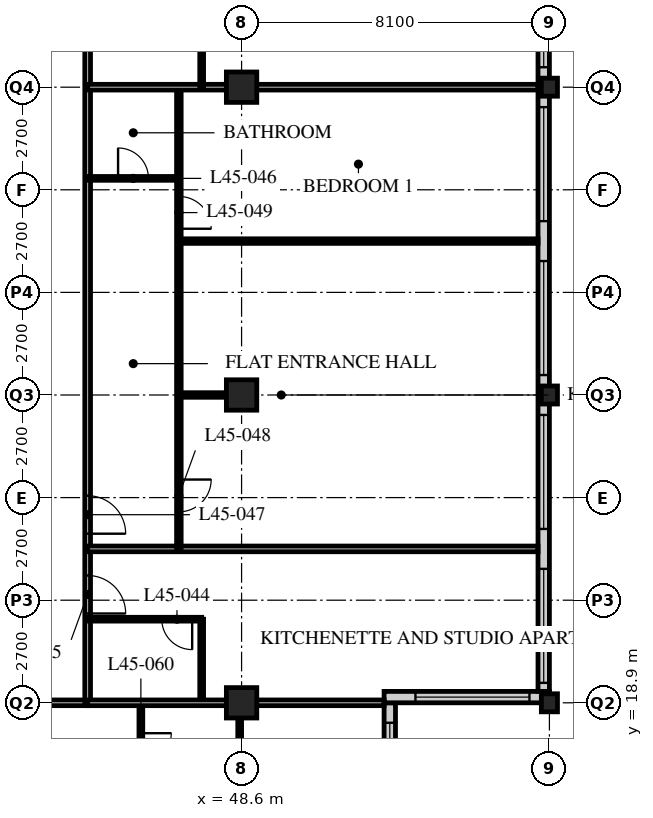
"""IFC4 building model, lengths in metres.
Left out: names, types, materials, properties, quantities, classifications, styles, units other than length and angle.
Written with IfcOpenShell. Run it as: python <this file> out.ifc"""

import sys

from ifc_helpers import new_model, si_unit, direction, frame, frame_2d, origin, origin_2d, place, context, subcontext, project, spatial, rectangle, hollow_rectangle, i_section, extrude, element, fill, save


model = new_model("IFC4")
c1 = context("Model", 3, precision=1e-05, world=origin(), true_north=direction((0.0, 1.0)))
c2 = subcontext(c1, "Body", "Model", "MODEL_VIEW")
j1 = project(units=[si_unit("LENGTHUNIT", "METRE"), si_unit("PLANEANGLEUNIT", "RADIAN")], contexts=[c1])
p1 = place(None, origin())
s1 = spatial("IfcSite", under=j1, at=p1, CompositionType="ELEMENT")
p2 = place(p1, origin())
s2 = spatial("IfcBuilding", under=s1, at=p2, CompositionType="ELEMENT")
p3 = place(p2, frame((0.0, 0.0, 177.6)))
s3 = spatial("IfcBuildingStorey", under=s2, at=p3, CompositionType="ELEMENT", Elevation=177.6)
for number, where, z_axis, x_axis in (
    (1, (48.6, 18.9, 0.0), (0.0, 0.0, 1.0), (1.0, 0.0, 0.0)),
    (2, (48.6, 27.0, 0.0), (0.0, 0.0, 1.0), (1.0, 0.0, 0.0)),
    (3, (48.6, 35.1, 0.0), (0.0, 0.0, 1.0), (1.0, 0.0, 0.0)),
):
    element("IfcColumn", number, at=place(p3, frame(where, z_axis=z_axis, x_axis=x_axis)), inside=s3, PredefinedType="COLUMN", context=c2, shape_type="SweptSolid", body=[
        extrude(hollow_rectangle(XDim=0.8, YDim=0.8, WallThickness=0.08, at=origin_2d()), origin(), (0.0, 0.0, 1.0), 3.6),
    ])
for number, where, z_axis, x_axis in (
    (4, (56.7, 18.9, 0.0), (0.0, 0.0, 1.0), (1.0, 0.0, 0.0)),
    (5, (56.7, 27.0, 0.0), (0.0, 0.0, 1.0), (1.0, 0.0, 0.0)),
    (6, (56.7, 35.1, 0.0), (0.0, 0.0, 1.0), (1.0, 0.0, 0.0)),
):
    element("IfcColumn", number, at=place(p3, frame(where, z_axis=z_axis, x_axis=x_axis)), inside=s3, PredefinedType="COLUMN", context=c2, shape_type="SweptSolid", body=[
        extrude(i_section(OverallWidth=0.424, OverallDepth=0.475, WebThickness=0.048, FlangeThickness=0.077, FilletRadius=0.015, at=origin_2d()), origin(), (0.0, 0.0, 1.0), 3.6),
    ])
p4 = place(p3, frame((52.5, 15.15, 0.0), z_axis=(0.0, 0.0, 1.0), x_axis=(0.0, 1.0, 0.0)))
e7 = element("IfcWall", 7, at=p4, inside=s3, PredefinedType="SOLIDWALL", context=c2, shape_type="SweptSolid", body=[
    extrude(rectangle(XDim=3.75, YDim=0.3, at=frame_2d((1.875, 0.0))), origin(), (0.0, 0.0, 1.0), 3.39),
])
p5 = place(p4, frame((0.225, 0.0, 0.6)))
e8 = element("IfcOpeningElement", 8, at=p5, cuts=e7, PredefinedType="OPENING", context=c2, shape_type="SweptSolid", body=[
    extrude(rectangle(XDim=3.0, YDim=2.0, at=frame_2d((1.5, 1.0))), frame((0.0, 0.16, 0.0), z_axis=(0.0, -1.0, 0.0), x_axis=(1.0, 0.0, 0.0)), (0.0, 0.0, 1.0), 0.32),
])
p6 = place(p3, frame((52.35, 19.05, 0.0), z_axis=(0.0, 0.0, 1.0), x_axis=(1.0, 0.0, 0.0)))
e9 = element("IfcWall", 9, at=p6, inside=s3, PredefinedType="SOLIDWALL", context=c2, shape_type="SweptSolid", body=[
    extrude(rectangle(XDim=4.35, YDim=0.3, at=frame_2d((2.175, 0.0))), origin(), (0.0, 0.0, 1.0), 3.39),
])
p7 = place(p6, frame((0.825, 0.0, 0.6)))
e10 = element("IfcOpeningElement", 10, at=p7, cuts=e9, PredefinedType="OPENING", context=c2, shape_type="SweptSolid", body=[
    extrude(rectangle(XDim=3.0, YDim=2.0, at=frame_2d((1.5, 1.0))), frame((0.0, 0.16, 0.0), z_axis=(0.0, -1.0, 0.0), x_axis=(1.0, 0.0, 0.0)), (0.0, 0.0, 1.0), 0.32),
])
p8 = place(p3, frame((56.55, 19.2, 0.0), z_axis=(0.0, 0.0, 1.0), x_axis=(0.0, 1.0, 0.0)))
e11 = element("IfcWall", 11, at=p8, inside=s3, PredefinedType="SOLIDWALL", context=c2, shape_type="SweptSolid", body=[
    extrude(rectangle(XDim=32.1, YDim=0.3, at=frame_2d((16.05, 0.0))), origin(), (0.0, 0.0, 1.0), 3.39),
])
p9 = place(p8, frame((0.225, 0.0, 0.6)))
e12 = element("IfcOpeningElement", 12, at=p9, cuts=e11, PredefinedType="OPENING", context=c2, shape_type="SweptSolid", body=[
    extrude(rectangle(XDim=3.0, YDim=2.4, at=frame_2d((1.5, 1.2))), frame((0.0, 0.16, 0.0), z_axis=(0.0, -1.0, 0.0), x_axis=(1.0, 0.0, 0.0)), (0.0, 0.0, 1.0), 0.32),
])
p10 = place(p8, frame((4.275, 0.0, 0.6)))
e13 = element("IfcOpeningElement", 13, at=p10, cuts=e11, PredefinedType="OPENING", context=c2, shape_type="SweptSolid", body=[
    extrude(rectangle(XDim=3.0, YDim=2.4, at=frame_2d((1.5, 1.2))), frame((0.0, 0.16, 0.0), z_axis=(0.0, -1.0, 0.0), x_axis=(1.0, 0.0, 0.0)), (0.0, 0.0, 1.0), 0.32),
])
p11 = place(p8, frame((8.325, 0.0, 0.6)))
e14 = element("IfcOpeningElement", 14, at=p11, cuts=e11, PredefinedType="OPENING", context=c2, shape_type="SweptSolid", body=[
    extrude(rectangle(XDim=3.0, YDim=2.4, at=frame_2d((1.5, 1.2))), frame((0.0, 0.16, 0.0), z_axis=(0.0, -1.0, 0.0), x_axis=(1.0, 0.0, 0.0)), (0.0, 0.0, 1.0), 0.32),
])
p12 = place(p8, frame((12.375, 0.0, 0.6)))
e15 = element("IfcOpeningElement", 15, at=p12, cuts=e11, PredefinedType="OPENING", context=c2, shape_type="SweptSolid", body=[
    extrude(rectangle(XDim=3.0, YDim=2.4, at=frame_2d((1.5, 1.2))), frame((0.0, 0.16, 0.0), z_axis=(0.0, -1.0, 0.0), x_axis=(1.0, 0.0, 0.0)), (0.0, 0.0, 1.0), 0.32),
])
p13 = place(p8, frame((16.425, 0.0, 0.6)))
e16 = element("IfcOpeningElement", 16, at=p13, cuts=e11, PredefinedType="OPENING", context=c2, shape_type="SweptSolid", body=[
    extrude(rectangle(XDim=3.0, YDim=2.4, at=frame_2d((1.5, 1.2))), frame((0.0, 0.16, 0.0), z_axis=(0.0, -1.0, 0.0), x_axis=(1.0, 0.0, 0.0)), (0.0, 0.0, 1.0), 0.32),
])
p14 = place(p8, frame((20.475, 0.0, 0.6)))
e17 = element("IfcOpeningElement", 17, at=p14, cuts=e11, PredefinedType="OPENING", context=c2, shape_type="SweptSolid", body=[
    extrude(rectangle(XDim=3.0, YDim=2.4, at=frame_2d((1.5, 1.2))), frame((0.0, 0.16, 0.0), z_axis=(0.0, -1.0, 0.0), x_axis=(1.0, 0.0, 0.0)), (0.0, 0.0, 1.0), 0.32),
])
p15 = place(p8, frame((24.525, 0.0, 0.6)))
e18 = element("IfcOpeningElement", 18, at=p15, cuts=e11, PredefinedType="OPENING", context=c2, shape_type="SweptSolid", body=[
    extrude(rectangle(XDim=3.0, YDim=2.4, at=frame_2d((1.5, 1.2))), frame((0.0, 0.16, 0.0), z_axis=(0.0, -1.0, 0.0), x_axis=(1.0, 0.0, 0.0)), (0.0, 0.0, 1.0), 0.32),
])
p16 = place(p8, frame((28.575, 0.0, 0.6)))
e19 = element("IfcOpeningElement", 19, at=p16, cuts=e11, PredefinedType="OPENING", context=c2, shape_type="SweptSolid", body=[
    extrude(rectangle(XDim=3.0, YDim=2.4, at=frame_2d((1.5, 1.2))), frame((0.0, 0.16, 0.0), z_axis=(0.0, -1.0, 0.0), x_axis=(1.0, 0.0, 0.0)), (0.0, 0.0, 1.0), 0.32),
])
p17 = place(p3, frame((12.15, 18.9, 0.0), z_axis=(0.0, 0.0, 1.0), x_axis=(1.0, 0.0, 0.0)))
e20 = element("IfcWall", 20, at=p17, inside=s3, PredefinedType="PARTITIONING", context=c2, shape_type="SweptSolid", body=[
    extrude(rectangle(XDim=32.4, YDim=0.15, at=frame_2d((16.2, 0.0))), origin(), (0.0, 0.0, 1.0), 2.778),
])
p18 = place(p17, frame((6.4, 0.0, 0.0)))
e21 = element("IfcOpeningElement", 21, at=p18, cuts=e20, PredefinedType="OPENING", context=c2, shape_type="SweptSolid", body=[
    extrude(rectangle(XDim=1.0, YDim=2.1, at=frame_2d((0.5, 1.05))), frame((0.0, 0.085, 0.0), z_axis=(0.0, -1.0, 0.0), x_axis=(1.0, 0.0, 0.0)), (0.0, 0.0, 1.0), 0.17),
])
p19 = place(p17, frame((8.8, 0.0, 0.0)))
e22 = element("IfcOpeningElement", 22, at=p19, cuts=e20, PredefinedType="OPENING", context=c2, shape_type="SweptSolid", body=[
    extrude(rectangle(XDim=1.0, YDim=2.1, at=frame_2d((0.5, 1.05))), frame((0.0, 0.085, 0.0), z_axis=(0.0, -1.0, 0.0), x_axis=(1.0, 0.0, 0.0)), (0.0, 0.0, 1.0), 0.17),
])
p20 = place(p17, frame((13.05, 0.0, 0.0)))
e23 = element("IfcOpeningElement", 23, at=p20, cuts=e20, PredefinedType="OPENING", context=c2, shape_type="SweptSolid", body=[
    extrude(rectangle(XDim=1.0, YDim=2.1, at=frame_2d((0.5, 1.05))), frame((0.0, 0.085, 0.0), z_axis=(0.0, -1.0, 0.0), x_axis=(1.0, 0.0, 0.0)), (0.0, 0.0, 1.0), 0.17),
])
p21 = place(p17, frame((22.6, 0.0, 0.0)))
e24 = element("IfcOpeningElement", 24, at=p21, cuts=e20, PredefinedType="OPENING", context=c2, shape_type="SweptSolid", body=[
    extrude(rectangle(XDim=1.0, YDim=2.1, at=frame_2d((0.5, 1.05))), frame((0.0, 0.085, 0.0), z_axis=(0.0, -1.0, 0.0), x_axis=(1.0, 0.0, 0.0)), (0.0, 0.0, 1.0), 0.17),
])
p22 = place(p17, frame((25.0, 0.0, 0.0)))
e25 = element("IfcOpeningElement", 25, at=p22, cuts=e20, PredefinedType="OPENING", context=c2, shape_type="SweptSolid", body=[
    extrude(rectangle(XDim=1.0, YDim=2.1, at=frame_2d((0.5, 1.05))), frame((0.0, 0.085, 0.0), z_axis=(0.0, -1.0, 0.0), x_axis=(1.0, 0.0, 0.0)), (0.0, 0.0, 1.0), 0.17),
])
p23 = place(p17, frame((1.525, 0.0, 0.0)))
e26 = element("IfcOpeningElement", 26, at=p23, cuts=e20, PredefinedType="OPENING", context=c2, shape_type="SweptSolid", body=[
    extrude(rectangle(XDim=1.0, YDim=2.1, at=frame_2d((0.5, 1.05))), frame((0.0, 0.085, 0.0), z_axis=(0.0, -1.0, 0.0), x_axis=(1.0, 0.0, 0.0)), (0.0, 0.0, 1.0), 0.17),
])
p24 = place(p17, frame((29.875, 0.0, 0.0)))
e27 = element("IfcOpeningElement", 27, at=p24, cuts=e20, PredefinedType="OPENING", context=c2, shape_type="SweptSolid", body=[
    extrude(rectangle(XDim=1.0, YDim=2.1, at=frame_2d((0.5, 1.05))), frame((0.0, 0.085, 0.0), z_axis=(0.0, -1.0, 0.0), x_axis=(1.0, 0.0, 0.0)), (0.0, 0.0, 1.0), 0.17),
])
p25 = place(p3, frame((44.55, 18.9, 0.0), z_axis=(0.0, 0.0, 1.0), x_axis=(0.0, 1.0, 0.0)))
e28 = element("IfcWall", 28, at=p25, inside=s3, PredefinedType="PARTITIONING", context=c2, shape_type="SweptSolid", body=[
    extrude(rectangle(XDim=24.3, YDim=0.15, at=frame_2d((12.15, 0.0))), origin(), (0.0, 0.0, 1.0), 3.39),
])
p26 = place(p25, frame((2.35, 0.0, 0.0)))
e29 = element("IfcOpeningElement", 29, at=p26, cuts=e28, PredefinedType="OPENING", context=c2, shape_type="SweptSolid", body=[
    extrude(rectangle(XDim=1.0, YDim=2.1, at=frame_2d((0.5, 1.05))), frame((0.0, 0.085, 0.0), z_axis=(0.0, -1.0, 0.0), x_axis=(1.0, 0.0, 0.0)), (0.0, 0.0, 1.0), 0.17),
])
p27 = place(p25, frame((4.45, 0.0, 0.0)))
e30 = element("IfcOpeningElement", 30, at=p27, cuts=e28, PredefinedType="OPENING", context=c2, shape_type="SweptSolid", body=[
    extrude(rectangle(XDim=1.0, YDim=2.1, at=frame_2d((0.5, 1.05))), frame((0.0, 0.085, 0.0), z_axis=(0.0, -1.0, 0.0), x_axis=(1.0, 0.0, 0.0)), (0.0, 0.0, 1.0), 0.17),
])
p28 = place(p25, frame((18.55, 0.0, 0.0)))
e31 = element("IfcOpeningElement", 31, at=p28, cuts=e28, PredefinedType="OPENING", context=c2, shape_type="SweptSolid", body=[
    extrude(rectangle(XDim=1.0, YDim=2.1, at=frame_2d((0.5, 1.05))), frame((0.0, 0.085, 0.0), z_axis=(0.0, -1.0, 0.0), x_axis=(1.0, 0.0, 0.0)), (0.0, 0.0, 1.0), 0.17),
])
p29 = place(p25, frame((22.6, 0.0, 0.0)))
e32 = element("IfcOpeningElement", 32, at=p29, cuts=e28, PredefinedType="OPENING", context=c2, shape_type="SweptSolid", body=[
    extrude(rectangle(XDim=1.0, YDim=2.1, at=frame_2d((0.5, 1.05))), frame((0.0, 0.085, 0.0), z_axis=(0.0, -1.0, 0.0), x_axis=(1.0, 0.0, 0.0)), (0.0, 0.0, 1.0), 0.17),
])
p30 = place(p3, frame((47.55, 18.9, 0.0), z_axis=(0.0, 0.0, 1.0), x_axis=(0.0, 1.0, 0.0)))
e33 = element("IfcWall", 33, at=p30, inside=s3, PredefinedType="PARTITIONING", context=c2, shape_type="SweptSolid", body=[
    extrude(rectangle(XDim=2.2, YDim=0.1, at=frame_2d((1.1, 0.0))), origin(), (0.0, 0.0, 1.0), 3.39),
])
p31 = place(p3, frame((44.55, 21.1, 0.0), z_axis=(0.0, 0.0, 1.0), x_axis=(1.0, 0.0, 0.0)))
e34 = element("IfcWall", 34, at=p31, inside=s3, PredefinedType="PARTITIONING", context=c2, shape_type="SweptSolid", body=[
    extrude(rectangle(XDim=3.0, YDim=0.1, at=frame_2d((1.5, 0.0))), origin(), (0.0, 0.0, 1.0), 3.39),
])
p32 = place(p31, frame((1.95, 0.0, 0.0)))
e35 = element("IfcOpeningElement", 35, at=p32, cuts=e34, PredefinedType="OPENING", context=c2, shape_type="SweptSolid", body=[
    extrude(rectangle(XDim=0.8, YDim=2.1, at=frame_2d((0.4, 1.05))), frame((0.0, 0.06, 0.0), z_axis=(0.0, -1.0, 0.0), x_axis=(1.0, 0.0, 0.0)), (0.0, 0.0, 1.0), 0.12),
])
p33 = place(p3, frame((44.55, 22.95, 0.0), z_axis=(0.0, 0.0, 1.0), x_axis=(1.0, 0.0, 0.0)))
e36 = element("IfcWall", 36, at=p33, inside=s3, PredefinedType="PARTITIONING", context=c2, shape_type="SweptSolid", body=[
    extrude(rectangle(XDim=11.85, YDim=0.15, at=frame_2d((5.925, 0.0))), origin(), (0.0, 0.0, 1.0), 3.39),
])
p34 = place(p3, frame((46.95, 22.95, 0.0), z_axis=(0.0, 0.0, 1.0), x_axis=(0.0, 1.0, 0.0)))
e37 = element("IfcWall", 37, at=p34, inside=s3, PredefinedType="PARTITIONING", context=c2, shape_type="SweptSolid", body=[
    extrude(rectangle(XDim=12.15, YDim=0.12, at=frame_2d((6.075, 0.0))), origin(), (0.0, 0.0, 1.0), 3.39),
])
p35 = place(p34, frame((0.975, 0.0, 0.0)))
e38 = element("IfcOpeningElement", 38, at=p35, cuts=e37, PredefinedType="OPENING", context=c2, shape_type="SweptSolid", body=[
    extrude(rectangle(XDim=0.85, YDim=2.1, at=frame_2d((0.425, 1.05))), frame((0.0, 0.07, 0.0), z_axis=(0.0, -1.0, 0.0), x_axis=(1.0, 0.0, 0.0)), (0.0, 0.0, 1.0), 0.14),
])
p36 = place(p34, frame((8.425, 0.0, 0.0)))
e39 = element("IfcOpeningElement", 39, at=p36, cuts=e37, PredefinedType="OPENING", context=c2, shape_type="SweptSolid", body=[
    extrude(rectangle(XDim=0.85, YDim=2.1, at=frame_2d((0.425, 1.05))), frame((0.0, 0.07, 0.0), z_axis=(0.0, -1.0, 0.0), x_axis=(1.0, 0.0, 0.0)), (0.0, 0.0, 1.0), 0.14),
])
p37 = place(p3, frame((44.55, 32.7, 0.0), z_axis=(0.0, 0.0, 1.0), x_axis=(1.0, 0.0, 0.0)))
e40 = element("IfcWall", 40, at=p37, inside=s3, PredefinedType="PARTITIONING", context=c2, shape_type="SweptSolid", body=[
    extrude(rectangle(XDim=2.4, YDim=0.1, at=frame_2d((1.2, 0.0))), origin(), (0.0, 0.0, 1.0), 3.39),
])
p38 = place(p37, frame((0.8, 0.0, 0.0)))
e41 = element("IfcOpeningElement", 41, at=p38, cuts=e40, PredefinedType="OPENING", context=c2, shape_type="SweptSolid", body=[
    extrude(rectangle(XDim=0.8, YDim=2.1, at=frame_2d((0.4, 1.05))), frame((0.0, 0.06, 0.0), z_axis=(0.0, -1.0, 0.0), x_axis=(1.0, 0.0, 0.0)), (0.0, 0.0, 1.0), 0.12),
])
p39 = place(p3, frame((46.95, 31.05, 0.0), z_axis=(0.0, 0.0, 1.0), x_axis=(1.0, 0.0, 0.0)))
e42 = element("IfcWall", 42, at=p39, inside=s3, PredefinedType="PARTITIONING", context=c2, shape_type="SweptSolid", body=[
    extrude(rectangle(XDim=9.45, YDim=0.12, at=frame_2d((4.725, 0.0))), origin(), (0.0, 0.0, 1.0), 3.39),
])
p40 = place(p3, frame((44.55, 35.1, 0.0), z_axis=(0.0, 0.0, 1.0), x_axis=(1.0, 0.0, 0.0)))
e43 = element("IfcWall", 43, at=p40, inside=s3, PredefinedType="PARTITIONING", context=c2, shape_type="SweptSolid", body=[
    extrude(rectangle(XDim=11.85, YDim=0.15, at=frame_2d((5.925, 0.0))), origin(), (0.0, 0.0, 1.0), 2.778),
])
p41 = place(p3, frame((47.55, 35.1, 0.0), z_axis=(0.0, 0.0, 1.0), x_axis=(0.0, 1.0, 0.0)))
e44 = element("IfcWall", 44, at=p41, inside=s3, PredefinedType="PARTITIONING", context=c2, shape_type="SweptSolid", body=[
    extrude(rectangle(XDim=2.2, YDim=0.1, at=frame_2d((1.1, 0.0))), origin(), (0.0, 0.0, 1.0), 3.39),
])
p42 = place(p3, frame((45.95, 18.9, 0.0), z_axis=(0.0, 0.0, 1.0), x_axis=(0.0, -1.0, 0.0)))
e45 = element("IfcWall", 45, at=p42, inside=s3, PredefinedType="PARTITIONING", context=c2, shape_type="SweptSolid", body=[
    extrude(rectangle(XDim=2.4, YDim=0.1, at=frame_2d((1.2, 0.0))), origin(), (0.0, 0.0, 1.0), 3.39),
])
p43 = place(p42, frame((0.8, 0.0, 0.0)))
e46 = element("IfcOpeningElement", 46, at=p43, cuts=e45, PredefinedType="OPENING", context=c2, shape_type="SweptSolid", body=[
    extrude(rectangle(XDim=0.8, YDim=2.1, at=frame_2d((0.4, 1.05))), frame((0.0, 0.06, 0.0), z_axis=(0.0, -1.0, 0.0), x_axis=(1.0, 0.0, 0.0)), (0.0, 0.0, 1.0), 0.12),
])
p44 = place(p3, frame((48.55, 18.9, 0.0), z_axis=(0.0, 0.0, 1.0), x_axis=(0.0, -1.0, 0.0)))
e47 = element("IfcWall", 47, at=p44, inside=s3, PredefinedType="PARTITIONING", context=c2, shape_type="SweptSolid", body=[
    extrude(rectangle(XDim=2.4, YDim=0.1, at=frame_2d((1.2, 0.0))), origin(), (0.0, 0.0, 1.0), 2.778),
])
p45 = place(p3, frame((44.55, 18.9, 0.0), z_axis=(0.0, 0.0, 1.0), x_axis=(1.0, 0.0, 0.0)))
e48 = element("IfcWall", 48, at=p45, inside=s3, PredefinedType="PARTITIONING", context=c2, shape_type="SweptSolid", body=[
    extrude(rectangle(XDim=7.8, YDim=0.15, at=frame_2d((3.9, 0.0))), origin(), (0.0, 0.0, 1.0), 2.778),
])
p46 = place(p3, frame((46.95, 27.0, 0.0), z_axis=(0.0, 0.0, 1.0), x_axis=(1.0, 0.0, 0.0)))
e49 = element("IfcWall", 49, at=p46, inside=s3, PredefinedType="PARTITIONING", context=c2, shape_type="SweptSolid", body=[
    extrude(rectangle(XDim=1.25, YDim=0.12, at=frame_2d((0.625, 0.0))), origin(), (0.0, 0.0, 1.0), 2.778),
])
p47 = place(p5, origin())
e50 = element("IfcWindow", 50, at=p47, inside=s3, PartitioningType="SINGLE_PANEL", PredefinedType="WINDOW", context=c2, shape_type="SweptSolid", body=[
    extrude(rectangle(XDim=3.0, YDim=2.0, at=frame_2d((1.5, 1.0))), frame((0.0, 0.03, 0.0), z_axis=(0.0, -1.0, 0.0), x_axis=(1.0, 0.0, 0.0)), (0.0, 0.0, 1.0), 0.06),
])
fill(e8, e50)
p48 = place(p7, origin())
e51 = element("IfcWindow", 51, at=p48, inside=s3, PartitioningType="SINGLE_PANEL", PredefinedType="WINDOW", context=c2, shape_type="SweptSolid", body=[
    extrude(rectangle(XDim=3.0, YDim=2.0, at=frame_2d((1.5, 1.0))), frame((0.0, 0.03, 0.0), z_axis=(0.0, -1.0, 0.0), x_axis=(1.0, 0.0, 0.0)), (0.0, 0.0, 1.0), 0.06),
])
fill(e10, e51)
p49 = place(p9, origin())
e52 = element("IfcWindow", 52, at=p49, inside=s3, PartitioningType="SINGLE_PANEL", PredefinedType="WINDOW", context=c2, shape_type="SweptSolid", body=[
    extrude(rectangle(XDim=3.0, YDim=2.4, at=frame_2d((1.5, 1.2))), frame((0.0, 0.03, 0.0), z_axis=(0.0, -1.0, 0.0), x_axis=(1.0, 0.0, 0.0)), (0.0, 0.0, 1.0), 0.06),
])
fill(e12, e52)
p50 = place(p10, origin())
e53 = element("IfcWindow", 53, at=p50, inside=s3, PartitioningType="SINGLE_PANEL", PredefinedType="WINDOW", context=c2, shape_type="SweptSolid", body=[
    extrude(rectangle(XDim=3.0, YDim=2.4, at=frame_2d((1.5, 1.2))), frame((0.0, 0.03, 0.0), z_axis=(0.0, -1.0, 0.0), x_axis=(1.0, 0.0, 0.0)), (0.0, 0.0, 1.0), 0.06),
])
fill(e13, e53)
p51 = place(p11, origin())
e54 = element("IfcWindow", 54, at=p51, inside=s3, PartitioningType="SINGLE_PANEL", PredefinedType="WINDOW", context=c2, shape_type="SweptSolid", body=[
    extrude(rectangle(XDim=3.0, YDim=2.4, at=frame_2d((1.5, 1.2))), frame((0.0, 0.03, 0.0), z_axis=(0.0, -1.0, 0.0), x_axis=(1.0, 0.0, 0.0)), (0.0, 0.0, 1.0), 0.06),
])
fill(e14, e54)
p52 = place(p12, origin())
e55 = element("IfcWindow", 55, at=p52, inside=s3, PartitioningType="SINGLE_PANEL", PredefinedType="WINDOW", context=c2, shape_type="SweptSolid", body=[
    extrude(rectangle(XDim=3.0, YDim=2.4, at=frame_2d((1.5, 1.2))), frame((0.0, 0.03, 0.0), z_axis=(0.0, -1.0, 0.0), x_axis=(1.0, 0.0, 0.0)), (0.0, 0.0, 1.0), 0.06),
])
fill(e15, e55)
p53 = place(p13, origin())
e56 = element("IfcWindow", 56, at=p53, inside=s3, PartitioningType="SINGLE_PANEL", PredefinedType="WINDOW", context=c2, shape_type="SweptSolid", body=[
    extrude(rectangle(XDim=3.0, YDim=2.4, at=frame_2d((1.5, 1.2))), frame((0.0, 0.03, 0.0), z_axis=(0.0, -1.0, 0.0), x_axis=(1.0, 0.0, 0.0)), (0.0, 0.0, 1.0), 0.06),
])
fill(e16, e56)
p54 = place(p32, origin())
e57 = element("IfcDoor", 57, at=p54, inside=s3, OperationType="SINGLE_SWING_LEFT", PredefinedType="DOOR", context=c2, shape_type="SweptSolid", body=[
    extrude(rectangle(XDim=0.8, YDim=2.1, at=frame_2d((0.4, 1.05))), frame((0.0, 0.025, 0.0), z_axis=(0.0, -1.0, 0.0), x_axis=(1.0, 0.0, 0.0)), (0.0, 0.0, 1.0), 0.05),
])
fill(e35, e57)
p55 = place(p26, origin())
e58 = element("IfcDoor", 58, at=p55, inside=s3, OperationType="SINGLE_SWING_RIGHT", PredefinedType="DOOR", context=c2, shape_type="SweptSolid", body=[
    extrude(rectangle(XDim=1.0, YDim=2.1, at=frame_2d((0.5, 1.05))), frame((0.0, 0.025, 0.0), z_axis=(0.0, -1.0, 0.0), x_axis=(1.0, 0.0, 0.0)), (0.0, 0.0, 1.0), 0.05),
])
fill(e29, e58)
p56 = place(p38, origin())
e59 = element("IfcDoor", 59, at=p56, inside=s3, OperationType="SINGLE_SWING_LEFT", PredefinedType="DOOR", context=c2, shape_type="SweptSolid", body=[
    extrude(rectangle(XDim=0.8, YDim=2.1, at=frame_2d((0.4, 1.05))), frame((0.0, 0.025, 0.0), z_axis=(0.0, -1.0, 0.0), x_axis=(1.0, 0.0, 0.0)), (0.0, 0.0, 1.0), 0.05),
])
fill(e41, e59)
p57 = place(p27, origin())
e60 = element("IfcDoor", 60, at=p57, inside=s3, OperationType="SINGLE_SWING_RIGHT", PredefinedType="DOOR", context=c2, shape_type="SweptSolid", body=[
    extrude(rectangle(XDim=1.0, YDim=2.1, at=frame_2d((0.5, 1.05))), frame((0.0, 0.025, 0.0), z_axis=(0.0, -1.0, 0.0), x_axis=(1.0, 0.0, 0.0)), (0.0, 0.0, 1.0), 0.05),
])
fill(e30, e60)
p58 = place(p35, origin())
e61 = element("IfcDoor", 61, at=p58, inside=s3, OperationType="SINGLE_SWING_LEFT", PredefinedType="DOOR", context=c2, shape_type="SweptSolid", body=[
    extrude(rectangle(XDim=0.85, YDim=2.1, at=frame_2d((0.425, 1.05))), frame((0.0, 0.025, 0.0), z_axis=(0.0, -1.0, 0.0), x_axis=(1.0, 0.0, 0.0)), (0.0, 0.0, 1.0), 0.05),
])
fill(e38, e61)
p59 = place(p36, origin())
e62 = element("IfcDoor", 62, at=p59, inside=s3, OperationType="SINGLE_SWING_RIGHT", PredefinedType="DOOR", context=c2, shape_type="SweptSolid", body=[
    extrude(rectangle(XDim=0.85, YDim=2.1, at=frame_2d((0.425, 1.05))), frame((0.0, 0.025, 0.0), z_axis=(0.0, -1.0, 0.0), x_axis=(1.0, 0.0, 0.0)), (0.0, 0.0, 1.0), 0.05),
])
fill(e39, e62)
p60 = place(p43, origin())
e63 = element("IfcDoor", 63, at=p60, inside=s3, OperationType="SINGLE_SWING_LEFT", PredefinedType="DOOR", context=c2, shape_type="SweptSolid", body=[
    extrude(rectangle(XDim=0.8, YDim=2.1, at=frame_2d((0.4, 1.05))), frame((0.0, 0.025, 0.0), z_axis=(0.0, -1.0, 0.0), x_axis=(1.0, 0.0, 0.0)), (0.0, 0.0, 1.0), 0.05),
])
fill(e46, e63)
save(model, sys.argv[1])
